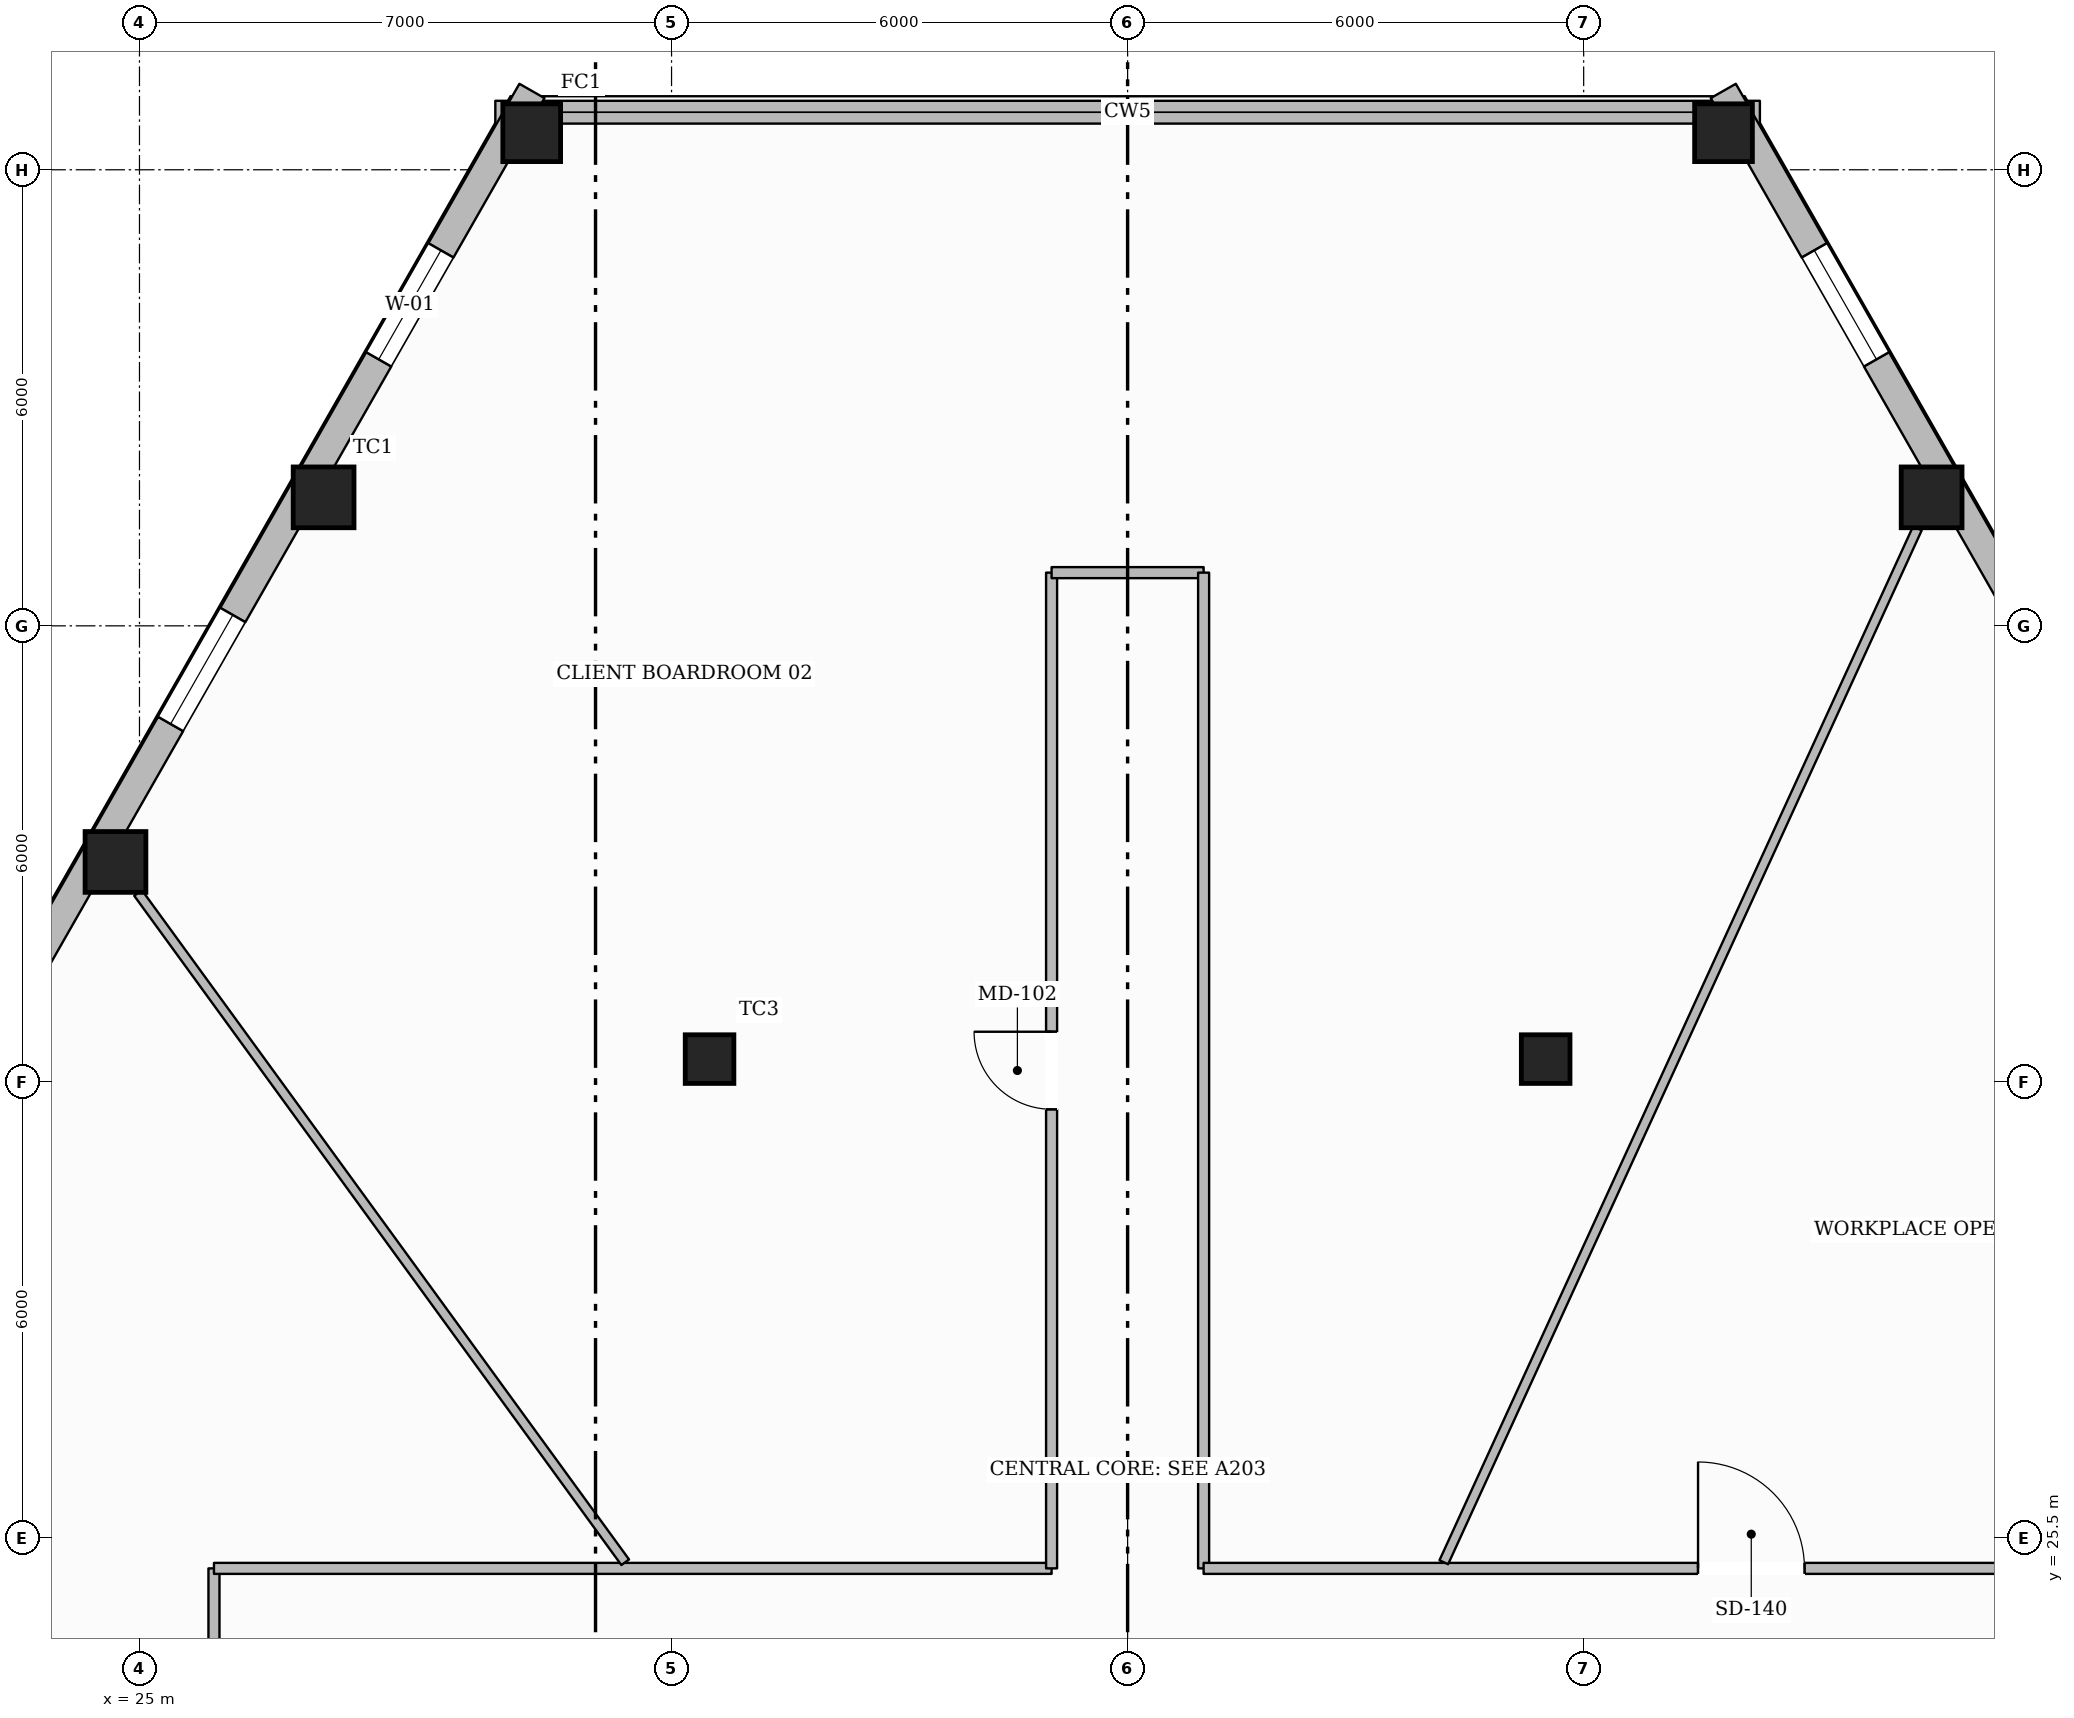
"""IFC4 building model, lengths in metres.
Left out: names, types, materials, properties, quantities, classifications, styles, units other than length and angle.
Written with IfcOpenShell. Run it as: python <this file> out.ifc"""

import sys

from ifc_helpers import new_model, si_unit, direction, frame, frame_2d, origin, origin_2d, place, context, subcontext, project, spatial, rectangle, hollow_rectangle, extrude, element, fill, save


model = new_model("IFC4")
c1 = context("Model", 3, precision=1e-05, world=origin(), true_north=direction((0.0, 1.0)))
c2 = subcontext(c1, "Body", "Model", "MODEL_VIEW")
j1 = project(units=[si_unit("LENGTHUNIT", "METRE"), si_unit("PLANEANGLEUNIT", "RADIAN")], contexts=[c1])
p1 = place(None, origin())
s1 = spatial("IfcSite", under=j1, at=p1, CompositionType="ELEMENT")
p2 = place(p1, origin())
s2 = spatial("IfcBuilding", under=s1, at=p2, CompositionType="ELEMENT")
p3 = place(p2, frame((0.0, 0.0, 21.4)))
s3 = spatial("IfcBuildingStorey", under=s2, at=p3, CompositionType="ELEMENT", Elevation=21.4)
p4 = place(p3, frame((30.16, 43.987, 0.0), z_axis=(0.0, 0.0, 1.0), x_axis=(1.0, 0.0, 0.0)))
e1 = element("IfcColumn", 1, at=p4, inside=s3, PredefinedType="COLUMN", context=c2, shape_type="SweptSolid", body=[
    extrude(hollow_rectangle(XDim=0.76, YDim=0.76, WallThickness=0.035, at=origin_2d()), origin(), (0.0, 0.0, 1.0), 3.59),
])
for number, where, z_axis, x_axis in (
    (2, (27.422, 39.19, 0.0), (0.0, 0.0, 1.0), (1.0, 0.0, 0.0)),
    (3, (24.684, 34.394, 0.0), (0.0, 0.0, 1.0), (1.0, 0.0, 0.0)),
    (4, (48.578, 39.19, 0.0), (0.0, 0.0, 1.0), (1.0, 0.0, 0.0)),
):
    element("IfcColumn", number, at=place(p3, frame(where, z_axis=z_axis, x_axis=x_axis)), inside=s3, PredefinedType="COLUMN", context=c2, shape_type="SweptSolid", body=[
        extrude(hollow_rectangle(XDim=0.8, YDim=0.8, WallThickness=0.036, at=origin_2d()), origin(), (0.0, 0.0, 1.0), 3.59),
    ])
p5 = place(p3, frame((45.84, 43.987, 0.0), z_axis=(0.0, 0.0, 1.0), x_axis=(1.0, 0.0, 0.0)))
e5 = element("IfcColumn", 5, at=p5, inside=s3, PredefinedType="COLUMN", context=c2, shape_type="SweptSolid", body=[
    extrude(hollow_rectangle(XDim=0.76, YDim=0.76, WallThickness=0.035, at=origin_2d()), origin(), (0.0, 0.0, 1.0), 3.59),
])
for number, where, z_axis, x_axis in (
    (6, (32.5, 31.8, 0.0), (0.0, 0.0, 1.0), (1.0, 0.0, 0.0)),
    (7, (43.5, 31.8, 0.0), (0.0, 0.0, 1.0), (1.0, 0.0, 0.0)),
):
    element("IfcColumn", number, at=place(p3, frame(where, z_axis=z_axis, x_axis=x_axis)), inside=s3, PredefinedType="COLUMN", context=c2, shape_type="SweptSolid", body=[
        extrude(hollow_rectangle(XDim=0.64, YDim=0.64, WallThickness=0.028, at=origin_2d()), origin(), (0.0, 0.0, 1.0), 3.59),
    ])
p6 = place(p3, frame((29.682, 44.257, 0.0), z_axis=(0.0, 0.0, 1.0), x_axis=(1.0, 0.0, 0.0)))
e8 = element("IfcWall", 8, at=p6, inside=s3, PredefinedType="STANDARD", context=c2, shape_type="SweptSolid", body=[
    extrude(rectangle(XDim=16.637, YDim=0.3, at=frame_2d((8.318, 0.0))), origin(), (0.0, 0.0, 1.0), 2.97),
])
p7 = place(p3, frame((13.263, 14.928, 0.0), z_axis=(0.0, 0.0, 1.0), x_axis=(0.495711630902, 0.868487178367, 0.0)))
e9 = element("IfcWall", 9, at=p7, inside=s3, PredefinedType="STANDARD", context=c2, shape_type="SweptSolid", body=[
    extrude(rectangle(XDim=34.092, YDim=0.38, at=frame_2d((17.046, 0.0))), origin(), (0.0, 0.0, 1.0), 2.97),
])
p8 = place(p7, frame((30.027, 0.0, 0.65)))
e10 = element("IfcOpeningElement", 10, at=p8, cuts=e9, PredefinedType="OPENING", context=c2, shape_type="SweptSolid", body=[
    extrude(rectangle(XDim=1.65, YDim=1.75, at=frame_2d((0.825, 0.875))), frame((0.0, 0.2, 0.0), z_axis=(0.0, -1.0, 0.0), x_axis=(1.0, 0.0, 0.0)), (0.0, 0.0, 1.0), 0.4),
])
p9 = place(p7, frame((24.504, 0.0, 0.65)))
e11 = element("IfcOpeningElement", 11, at=p9, cuts=e9, PredefinedType="OPENING", context=c2, shape_type="SweptSolid", body=[
    extrude(rectangle(XDim=1.65, YDim=1.75, at=frame_2d((0.825, 0.875))), frame((0.0, 0.2, 0.0), z_axis=(0.0, -1.0, 0.0), x_axis=(1.0, 0.0, 0.0)), (0.0, 0.0, 1.0), 0.4),
])
p10 = place(p7, frame((13.457, 0.0, 0.65)))
e12 = element("IfcOpeningElement", 12, at=p10, cuts=e9, PredefinedType="OPENING", context=c2, shape_type="SweptSolid", body=[
    extrude(rectangle(XDim=1.65, YDim=1.75, at=frame_2d((0.825, 0.875))), frame((0.0, 0.2, 0.0), z_axis=(0.0, -1.0, 0.0), x_axis=(1.0, 0.0, 0.0)), (0.0, 0.0, 1.0), 0.4),
])
p11 = place(p7, frame((7.934, 0.0, 0.65)))
e13 = element("IfcOpeningElement", 13, at=p11, cuts=e9, PredefinedType="OPENING", context=c2, shape_type="SweptSolid", body=[
    extrude(rectangle(XDim=1.65, YDim=1.75, at=frame_2d((0.825, 0.875))), frame((0.0, 0.2, 0.0), z_axis=(0.0, -1.0, 0.0), x_axis=(1.0, 0.0, 0.0)), (0.0, 0.0, 1.0), 0.4),
])
p12 = place(p7, frame((2.411, 0.0, 0.65)))
e14 = element("IfcOpeningElement", 14, at=p12, cuts=e9, PredefinedType="OPENING", context=c2, shape_type="SweptSolid", body=[
    extrude(rectangle(XDim=1.65, YDim=1.75, at=frame_2d((0.825, 0.875))), frame((0.0, 0.2, 0.0), z_axis=(0.0, -1.0, 0.0), x_axis=(1.0, 0.0, 0.0)), (0.0, 0.0, 1.0), 0.4),
])
p13 = place(p3, frame((45.837, 44.537, 0.0), z_axis=(0.0, 0.0, 1.0), x_axis=(0.495711630902, -0.868487178367, 0.0)))
e15 = element("IfcWall", 15, at=p13, inside=s3, PredefinedType="STANDARD", context=c2, shape_type="SweptSolid", body=[
    extrude(rectangle(XDim=34.092, YDim=0.38, at=frame_2d((17.046, 0.0))), origin(), (0.0, 0.0, 1.0), 2.97),
])
p14 = place(p13, frame((30.031, 0.0, 0.65)))
e16 = element("IfcOpeningElement", 16, at=p14, cuts=e15, PredefinedType="OPENING", context=c2, shape_type="SweptSolid", body=[
    extrude(rectangle(XDim=1.65, YDim=1.75, at=frame_2d((0.825, 0.875))), frame((0.0, 0.2, 0.0), z_axis=(0.0, -1.0, 0.0), x_axis=(1.0, 0.0, 0.0)), (0.0, 0.0, 1.0), 0.4),
])
p15 = place(p13, frame((24.508, 0.0, 0.65)))
e17 = element("IfcOpeningElement", 17, at=p15, cuts=e15, PredefinedType="OPENING", context=c2, shape_type="SweptSolid", body=[
    extrude(rectangle(XDim=1.65, YDim=1.75, at=frame_2d((0.825, 0.875))), frame((0.0, 0.2, 0.0), z_axis=(0.0, -1.0, 0.0), x_axis=(1.0, 0.0, 0.0)), (0.0, 0.0, 1.0), 0.4),
])
p16 = place(p13, frame((13.462, 0.0, 0.65)))
e18 = element("IfcOpeningElement", 18, at=p16, cuts=e15, PredefinedType="OPENING", context=c2, shape_type="SweptSolid", body=[
    extrude(rectangle(XDim=1.65, YDim=1.75, at=frame_2d((0.825, 0.875))), frame((0.0, 0.2, 0.0), z_axis=(0.0, -1.0, 0.0), x_axis=(1.0, 0.0, 0.0)), (0.0, 0.0, 1.0), 0.4),
])
p17 = place(p13, frame((7.939, 0.0, 0.65)))
e19 = element("IfcOpeningElement", 19, at=p17, cuts=e15, PredefinedType="OPENING", context=c2, shape_type="SweptSolid", body=[
    extrude(rectangle(XDim=1.65, YDim=1.75, at=frame_2d((0.825, 0.875))), frame((0.0, 0.2, 0.0), z_axis=(0.0, -1.0, 0.0), x_axis=(1.0, 0.0, 0.0)), (0.0, 0.0, 1.0), 0.4),
])
p18 = place(p13, frame((2.415, 0.0, 0.65)))
e20 = element("IfcOpeningElement", 20, at=p18, cuts=e15, PredefinedType="OPENING", context=c2, shape_type="SweptSolid", body=[
    extrude(rectangle(XDim=1.65, YDim=1.75, at=frame_2d((0.825, 0.875))), frame((0.0, 0.2, 0.0), z_axis=(0.0, -1.0, 0.0), x_axis=(1.0, 0.0, 0.0)), (0.0, 0.0, 1.0), 0.4),
])
p19 = place(p3, frame((25.98, 9.1, 0.0), z_axis=(0.0, 0.0, 1.0), x_axis=(0.0, 1.0, 0.0)))
e21 = element("IfcWall", 21, at=p19, inside=s3, PredefinedType="PARTITIONING", context=c2, shape_type="SweptSolid", body=[
    extrude(rectangle(XDim=16.0, YDim=0.145, at=frame_2d((8.0, 0.0))), origin(), (0.0, 0.0, 1.0), 3.278),
])
p20 = place(p19, frame((10.491, 0.0, 0.0)))
e22 = element("IfcOpeningElement", 22, at=p20, cuts=e21, PredefinedType="OPENING", context=c2, shape_type="SweptSolid", body=[
    extrude(rectangle(XDim=1.4, YDim=2.2, at=frame_2d((0.7, 1.1))), frame((0.0, 0.083, 0.0), z_axis=(0.0, -1.0, 0.0), x_axis=(1.0, 0.0, 0.0)), (0.0, 0.0, 1.0), 0.165),
])
p21 = place(p19, frame((2.663, 0.0, 0.0)))
e23 = element("IfcOpeningElement", 23, at=p21, cuts=e21, PredefinedType="OPENING", context=c2, shape_type="SweptSolid", body=[
    extrude(rectangle(XDim=1.4, YDim=2.2, at=frame_2d((0.7, 1.1))), frame((0.0, 0.083, 0.0), z_axis=(0.0, -1.0, 0.0), x_axis=(1.0, 0.0, 0.0)), (0.0, 0.0, 1.0), 0.165),
])
p22 = place(p3, frame((25.98, 25.1, 0.0), z_axis=(0.0, 0.0, 1.0), x_axis=(1.0, 0.0, 0.0)))
e24 = element("IfcWall", 24, at=p22, inside=s3, PredefinedType="PARTITIONING", context=c2, shape_type="SweptSolid", body=[
    extrude(rectangle(XDim=11.02, YDim=0.145, at=frame_2d((5.51, 0.0))), origin(), (0.0, 0.0, 1.0), 3.59),
])
p23 = place(p3, frame((37.0, 25.1, 0.0), z_axis=(0.0, 0.0, 1.0), x_axis=(0.0, 1.0, 0.0)))
e25 = element("IfcWall", 25, at=p23, inside=s3, PredefinedType="PARTITIONING", context=c2, shape_type="SweptSolid", body=[
    extrude(rectangle(XDim=13.1, YDim=0.145, at=frame_2d((6.55, 0.0))), origin(), (0.0, 0.0, 1.0), 3.59),
])
p24 = place(p23, frame((6.04, 0.0, 0.0)))
e26 = element("IfcOpeningElement", 26, at=p24, cuts=e25, PredefinedType="OPENING", context=c2, shape_type="SweptSolid", body=[
    extrude(rectangle(XDim=1.02, YDim=2.15, at=frame_2d((0.51, 1.075))), frame((0.0, 0.083, 0.0), z_axis=(0.0, -1.0, 0.0), x_axis=(1.0, 0.0, 0.0)), (0.0, 0.0, 1.0), 0.165),
])
p25 = place(p3, frame((37.0, 38.2, 0.0), z_axis=(0.0, 0.0, 1.0), x_axis=(1.0, 0.0, 0.0)))
e27 = element("IfcWall", 27, at=p25, inside=s3, PredefinedType="PARTITIONING", context=c2, shape_type="SweptSolid", body=[
    extrude(rectangle(XDim=2.0, YDim=0.145, at=frame_2d((1.0, 0.0))), origin(), (0.0, 0.0, 1.0), 3.59),
])
p26 = place(p3, frame((39.0, 38.2, 0.0), z_axis=(0.0, 0.0, 1.0), x_axis=(0.0, -1.0, 0.0)))
e28 = element("IfcWall", 28, at=p26, inside=s3, PredefinedType="PARTITIONING", context=c2, shape_type="SweptSolid", body=[
    extrude(rectangle(XDim=13.1, YDim=0.145, at=frame_2d((6.55, 0.0))), origin(), (0.0, 0.0, 1.0), 3.59),
])
p27 = place(p3, frame((39.0, 25.1, 0.0), z_axis=(0.0, 0.0, 1.0), x_axis=(1.0, 0.0, 0.0)))
e29 = element("IfcWall", 29, at=p27, inside=s3, PredefinedType="PARTITIONING", context=c2, shape_type="SweptSolid", body=[
    extrude(rectangle(XDim=11.02, YDim=0.145, at=frame_2d((5.51, 0.0))), origin(), (0.0, 0.0, 1.0), 3.59),
])
p28 = place(p27, frame((6.505, 0.0, 0.0)))
e30 = element("IfcOpeningElement", 30, at=p28, cuts=e29, PredefinedType="OPENING", context=c2, shape_type="SweptSolid", body=[
    extrude(rectangle(XDim=1.4, YDim=2.2, at=frame_2d((0.7, 1.1))), frame((0.0, 0.083, 0.0), z_axis=(0.0, -1.0, 0.0), x_axis=(1.0, 0.0, 0.0)), (0.0, 0.0, 1.0), 0.165),
])
p29 = place(p3, frame((42.16, 25.18, 0.0), z_axis=(0.0, 0.0, 1.0), x_axis=(0.416471526835, 0.90914875974, 0.0)))
e31 = element("IfcWall", 31, at=p29, inside=s3, PredefinedType="PARTITIONING", context=c2, shape_type="SweptSolid", body=[
    extrude(rectangle(XDim=14.961, YDim=0.125, at=frame_2d((7.481, 0.0))), origin(), (0.0, 0.0, 1.0), 3.057),
])
p30 = place(p3, frame((31.39, 25.18, 0.0), z_axis=(0.0, 0.0, 1.0), x_axis=(-0.588482227792, 0.808510153043, 0.0)))
e32 = element("IfcWall", 32, at=p30, inside=s3, PredefinedType="PARTITIONING", context=c2, shape_type="SweptSolid", body=[
    extrude(rectangle(XDim=10.891, YDim=0.125, at=frame_2d((5.445, 0.0))), origin(), (0.0, 0.0, 1.0), 3.057),
])
p31 = place(p8, origin())
e33 = element("IfcWindow", 33, at=p31, inside=s3, PartitioningType="SINGLE_PANEL", PredefinedType="WINDOW", context=c2, shape_type="SweptSolid", body=[
    extrude(rectangle(XDim=1.65, YDim=1.75, at=frame_2d((0.825, 0.875))), frame((0.0, 0.03, 0.0), z_axis=(0.0, -1.0, 0.0), x_axis=(1.0, 0.0, 0.0)), (0.0, 0.0, 1.0), 0.06),
])
fill(e10, e33)
p32 = place(p9, origin())
e34 = element("IfcWindow", 34, at=p32, inside=s3, PartitioningType="SINGLE_PANEL", PredefinedType="WINDOW", context=c2, shape_type="SweptSolid", body=[
    extrude(rectangle(XDim=1.65, YDim=1.75, at=frame_2d((0.825, 0.875))), frame((0.0, 0.03, 0.0), z_axis=(0.0, -1.0, 0.0), x_axis=(1.0, 0.0, 0.0)), (0.0, 0.0, 1.0), 0.06),
])
fill(e11, e34)
p33 = place(p18, origin())
e35 = element("IfcWindow", 35, at=p33, inside=s3, PartitioningType="SINGLE_PANEL", PredefinedType="WINDOW", context=c2, shape_type="SweptSolid", body=[
    extrude(rectangle(XDim=1.65, YDim=1.75, at=frame_2d((0.825, 0.875))), frame((0.0, 0.03, 0.0), z_axis=(0.0, -1.0, 0.0), x_axis=(1.0, 0.0, 0.0)), (0.0, 0.0, 1.0), 0.06),
])
fill(e20, e35)
p34 = place(p28, origin())
e36 = element("IfcDoor", 36, at=p34, inside=s3, OperationType="SINGLE_SWING_LEFT", PredefinedType="DOOR", context=c2, shape_type="SweptSolid", body=[
    extrude(rectangle(XDim=1.4, YDim=2.2, at=frame_2d((0.7, 1.1))), frame((0.0, 0.025, 0.0), z_axis=(0.0, -1.0, 0.0), x_axis=(1.0, 0.0, 0.0)), (0.0, 0.0, 1.0), 0.05),
])
fill(e30, e36)
p35 = place(p24, origin())
e37 = element("IfcDoor", 37, at=p35, inside=s3, OperationType="SINGLE_SWING_RIGHT", PredefinedType="DOOR", context=c2, shape_type="SweptSolid", body=[
    extrude(rectangle(XDim=1.02, YDim=2.15, at=frame_2d((0.51, 1.075))), frame((0.0, 0.025, 0.0), z_axis=(0.0, -1.0, 0.0), x_axis=(1.0, 0.0, 0.0)), (0.0, 0.0, 1.0), 0.05),
])
fill(e26, e37)
save(model, sys.argv[1])
